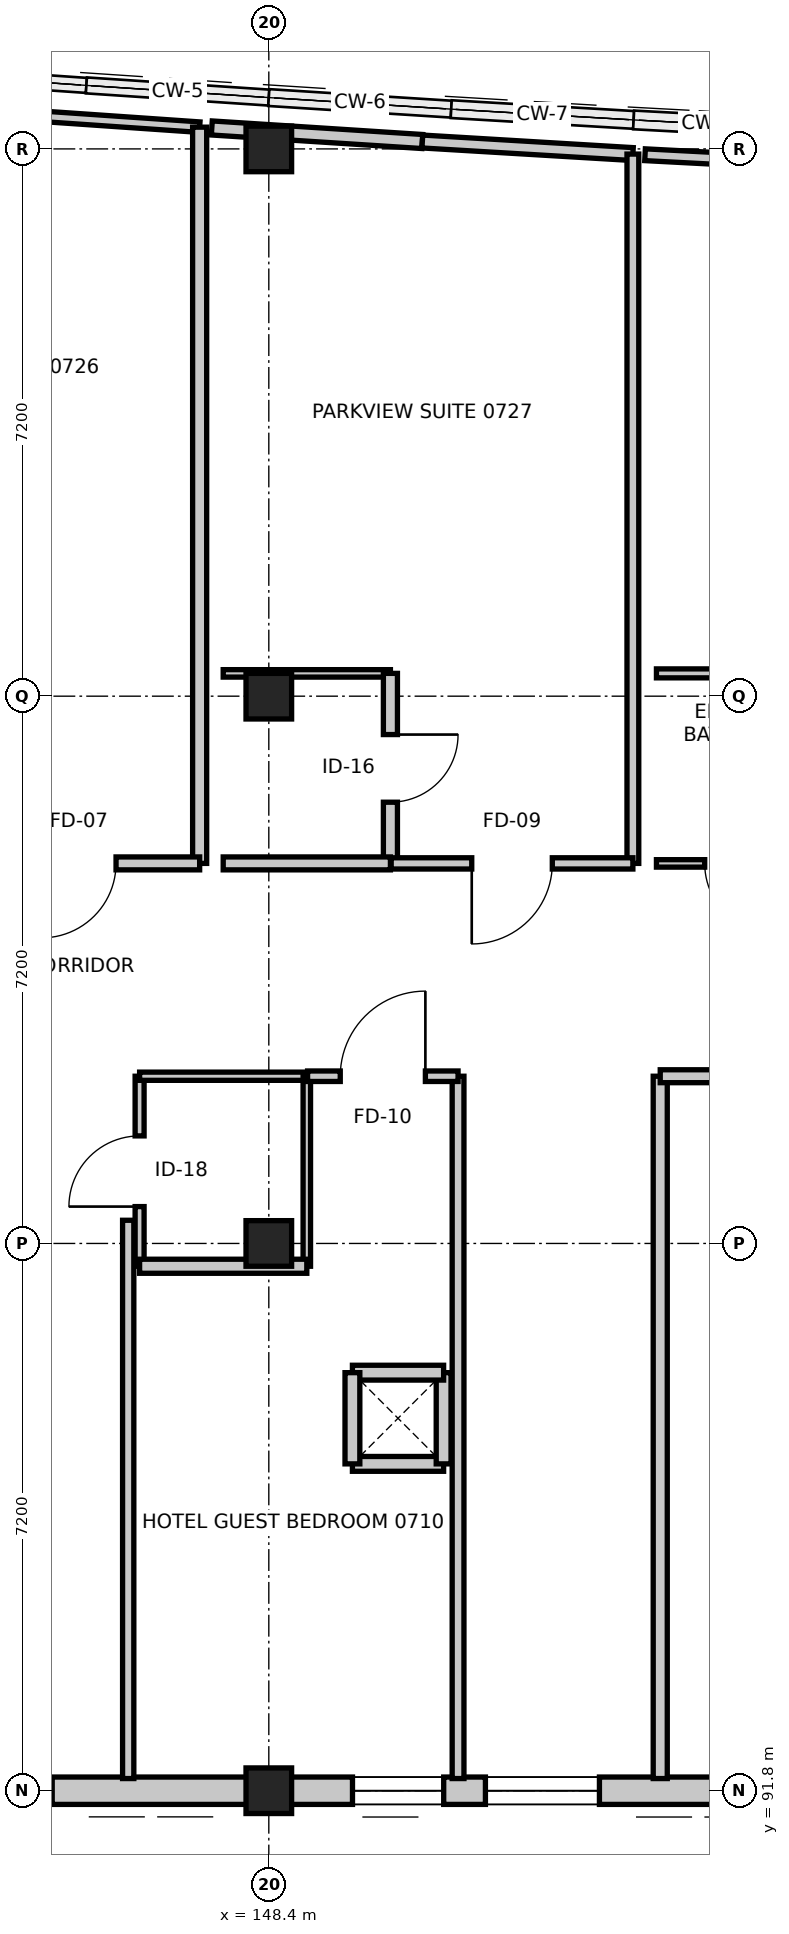
"""IFC4 building model, lengths in metres.
Left out: names, types, materials, properties, quantities, classifications, styles, units other than length and angle.
Written with IfcOpenShell. Run it as: python <this file> out.ifc"""

import sys

from ifc_helpers import new_model, si_unit, direction, frame, frame_2d, origin, origin_2d, place, context, subcontext, project, spatial, rectangle, extrude, element, fill, save


model = new_model("IFC4")
c1 = context("Model", 3, precision=1e-05, world=origin(), true_north=direction((0.0, 1.0)))
c2 = subcontext(c1, "Body", "Model", "MODEL_VIEW")
j1 = project(units=[si_unit("LENGTHUNIT", "METRE"), si_unit("PLANEANGLEUNIT", "RADIAN")], contexts=[c1])
p1 = place(None, origin())
s1 = spatial("IfcSite", under=j1, at=p1, CompositionType="ELEMENT")
p2 = place(p1, origin())
s2 = spatial("IfcBuilding", under=s1, at=p2, CompositionType="ELEMENT")
p3 = place(p2, frame((0.0, 0.0, 30.0)))
s3 = spatial("IfcBuildingStorey", under=s2, at=p3, CompositionType="ELEMENT", Elevation=30.0)
for number, where, z_axis, x_axis in (
    (1, (148.4, 91.8, 0.0), (0.0, 0.0, 1.0), (1.0, 0.0, 0.0)),
    (2, (148.4, 99.0, 0.0), (0.0, 0.0, 1.0), (1.0, 0.0, 0.0)),
    (3, (148.4, 106.2, 0.0), (0.0, 0.0, 1.0), (1.0, 0.0, 0.0)),
    (4, (148.4, 113.4, 0.0), (0.0, 0.0, 1.0), (1.0, 0.0, 0.0)),
):
    element("IfcColumn", number, at=place(p3, frame(where, z_axis=z_axis, x_axis=x_axis)), inside=s3, PredefinedType="COLUMN", context=c2, shape_type="SweptSolid", body=[
        extrude(rectangle(XDim=0.6, YDim=0.6, at=origin_2d()), origin(), (0.0, 0.0, 1.0), 3.6),
    ])
p4 = place(p3, frame((155.6, 91.8, 0.0), z_axis=(0.0, 0.0, 1.0), x_axis=(-1.0, 0.0, 0.0)))
e5 = element("IfcWall", 5, at=p4, inside=s3, PredefinedType="STANDARD", context=c2, shape_type="SweptSolid", body=[
    extrude(rectangle(XDim=7.2, YDim=0.36, at=frame_2d((3.6, 0.0))), origin(), (0.0, 0.0, 1.0), 2.745),
])
p5 = place(p4, frame((2.85, 0.0, 0.75)))
e6 = element("IfcOpeningElement", 6, at=p5, cuts=e5, PredefinedType="OPENING", context=c2, shape_type="SweptSolid", body=[
    extrude(rectangle(XDim=1.5, YDim=1.5, at=frame_2d((0.75, 0.75))), frame((0.0, 0.19, 0.0), z_axis=(0.0, -1.0, 0.0), x_axis=(1.0, 0.0, 0.0)), (0.0, 0.0, 1.0), 0.38),
])
p6 = place(p4, frame((4.899, 0.0, 0.85)))
e7 = element("IfcOpeningElement", 7, at=p6, cuts=e5, PredefinedType="OPENING", context=c2, shape_type="SweptSolid", body=[
    extrude(rectangle(XDim=1.2, YDim=1.8, at=frame_2d((0.6, 0.9))), frame((0.0, 0.19, 0.0), z_axis=(0.0, -1.0, 0.0), x_axis=(1.0, 0.0, 0.0)), (0.0, 0.0, 1.0), 0.38),
])
p7 = place(p3, frame((148.4, 91.8, 0.0), z_axis=(0.0, 0.0, 1.0), x_axis=(-1.0, 0.0, 0.0)))
e8 = element("IfcWall", 8, at=p7, inside=s3, PredefinedType="STANDARD", context=c2, shape_type="SweptSolid", body=[
    extrude(rectangle(XDim=7.2, YDim=0.36, at=frame_2d((3.6, 0.0))), origin(), (0.0, 0.0, 1.0), 2.745),
])
p8 = place(p7, frame((2.85, 0.0, 0.75)))
e9 = element("IfcOpeningElement", 9, at=p8, cuts=e8, PredefinedType="OPENING", context=c2, shape_type="SweptSolid", body=[
    extrude(rectangle(XDim=1.5, YDim=1.5, at=frame_2d((0.75, 0.75))), frame((0.0, 0.19, 0.0), z_axis=(0.0, -1.0, 0.0), x_axis=(1.0, 0.0, 0.0)), (0.0, 0.0, 1.0), 0.38),
])
for number, where, z_axis, x_axis in (
    (10, (149.5, 96.1, 0.0), (0.0, 0.0, 1.0), (1.0, 0.0, 0.0)),
    (11, (150.7, 96.1, 0.0), (0.0, 0.0, 1.0), (0.0, 1.0, 0.0)),
    (12, (150.7, 97.3, 0.0), (0.0, 0.0, 1.0), (-1.0, 0.0, 0.0)),
    (13, (149.5, 97.3, 0.0), (0.0, 0.0, 1.0), (0.0, -1.0, 0.0)),
):
    element("IfcWall", number, at=place(p3, frame(where, z_axis=z_axis, x_axis=x_axis)), inside=s3, PredefinedType="PARAPET", context=c2, shape_type="SweptSolid", body=[
        extrude(rectangle(XDim=1.2, YDim=0.195, at=frame_2d((0.6, 0.0))), origin(), (0.0, 0.0, 1.0), 3.36),
    ])
p9 = place(p3, frame((153.55, 91.96, 0.0), z_axis=(0.0, 0.0, 1.0), x_axis=(0.0, 1.0, 0.0)))
e14 = element("IfcWall", 14, at=p9, inside=s3, PredefinedType="PARTITIONING", context=c2, shape_type="SweptSolid", body=[
    extrude(rectangle(XDim=9.24, YDim=0.185, at=frame_2d((4.62, 0.0))), origin(), (0.0, 0.0, 1.0), 2.745),
])
p10 = place(p3, frame((153.55, 101.2, 0.0), z_axis=(0.0, 0.0, 1.0), x_axis=(1.0, 0.0, 0.0)))
e15 = element("IfcWall", 15, at=p10, inside=s3, PredefinedType="PARTITIONING", context=c2, shape_type="SweptSolid", body=[
    extrude(rectangle(XDim=8.8, YDim=0.17, at=frame_2d((4.4, 0.0))), origin(), (0.0, 0.0, 1.0), 2.695),
])
p11 = place(p10, frame((3.5, 0.0, 0.0)))
e16 = element("IfcOpeningElement", 16, at=p11, cuts=e15, PredefinedType="OPENING", context=c2, shape_type="SweptSolid", body=[
    extrude(rectangle(XDim=1.8, YDim=2.2, at=frame_2d((0.9, 1.1))), frame((0.0, 0.095, 0.0), z_axis=(0.0, -1.0, 0.0), x_axis=(1.0, 0.0, 0.0)), (0.0, 0.0, 1.0), 0.19),
])
p12 = place(p3, frame((146.7, 98.7, 0.0), z_axis=(0.0, 0.0, 1.0), x_axis=(0.0, 1.0, 0.0)))
e17 = element("IfcWall", 17, at=p12, inside=s3, PredefinedType="PARTITIONING", context=c2, shape_type="SweptSolid", body=[
    extrude(rectangle(XDim=2.5, YDim=0.118, at=frame_2d((1.25, 0.0))), origin(), (0.0, 0.0, 1.0), 2.745),
])
p13 = place(p12, frame((0.785, 0.0, 0.0)))
e18 = element("IfcOpeningElement", 18, at=p13, cuts=e17, PredefinedType="OPENING", context=c2, shape_type="SweptSolid", body=[
    extrude(rectangle(XDim=0.93, YDim=2.13, at=frame_2d((0.465, 1.065))), frame((0.0, 0.069, 0.0), z_axis=(0.0, -1.0, 0.0), x_axis=(1.0, 0.0, 0.0)), (0.0, 0.0, 1.0), 0.138),
])
p14 = place(p3, frame((146.7, 101.2, 0.0), z_axis=(0.0, 0.0, 1.0), x_axis=(1.0, 0.0, 0.0)))
e19 = element("IfcWall", 19, at=p14, inside=s3, PredefinedType="PARTITIONING", context=c2, shape_type="SweptSolid", body=[
    extrude(rectangle(XDim=2.2, YDim=0.108, at=frame_2d((1.1, 0.0))), origin(), (0.0, 0.0, 1.0), 2.695),
])
p15 = place(p3, frame((148.9, 101.2, 0.0), z_axis=(0.0, 0.0, 1.0), x_axis=(0.0, -1.0, 0.0)))
e20 = element("IfcWall", 20, at=p15, inside=s3, PredefinedType="PARTITIONING", context=c2, shape_type="SweptSolid", body=[
    extrude(rectangle(XDim=2.5, YDim=0.098, at=frame_2d((1.25, 0.0))), origin(), (0.0, 0.0, 1.0), 2.745),
])
p16 = place(p3, frame((148.9, 98.7, 0.0), z_axis=(0.0, 0.0, 1.0), x_axis=(-1.0, 0.0, 0.0)))
e21 = element("IfcWall", 21, at=p16, inside=s3, PredefinedType="PARTITIONING", context=c2, shape_type="SweptSolid", body=[
    extrude(rectangle(XDim=2.2, YDim=0.185, at=frame_2d((1.1, 0.0))), origin(), (0.0, 0.0, 1.0), 2.695),
])
p17 = place(p3, frame((150.89, 101.2, 0.0), z_axis=(0.0, 0.0, 1.0), x_axis=(0.0, -1.0, 0.0)))
e22 = element("IfcWall", 22, at=p17, inside=s3, PredefinedType="PARTITIONING", context=c2, shape_type="SweptSolid", body=[
    extrude(rectangle(XDim=9.24, YDim=0.155, at=frame_2d((4.62, 0.0))), origin(), (0.0, 0.0, 1.0), 2.745),
])
p18 = place(p3, frame((146.55, 91.96, 0.0), z_axis=(0.0, 0.0, 1.0), x_axis=(0.0, 1.0, 0.0)))
e23 = element("IfcWall", 23, at=p18, inside=s3, PredefinedType="PARTITIONING", context=c2, shape_type="SweptSolid", body=[
    extrude(rectangle(XDim=7.345, YDim=0.148, at=frame_2d((3.672, 0.0))), origin(), (0.0, 0.0, 1.0), 2.745),
])
p19 = place(p3, frame((148.91, 101.2, 0.0), z_axis=(0.0, 0.0, 1.0), x_axis=(1.0, 0.0, 0.0)))
e24 = element("IfcWall", 24, at=p19, inside=s3, PredefinedType="PARTITIONING", context=c2, shape_type="SweptSolid", body=[
    extrude(rectangle(XDim=1.98, YDim=0.138, at=frame_2d((0.99, 0.0))), origin(), (0.0, 0.0, 1.0), 3.36),
])
p20 = place(p19, frame((0.43, 0.0, 0.0)))
e25 = element("IfcOpeningElement", 25, at=p20, cuts=e24, PredefinedType="OPENING", context=c2, shape_type="SweptSolid", body=[
    extrude(rectangle(XDim=1.12, YDim=2.2, at=frame_2d((0.56, 1.1))), frame((0.0, 0.079, 0.0), z_axis=(0.0, -1.0, 0.0), x_axis=(1.0, 0.0, 0.0)), (0.0, 0.0, 1.0), 0.158),
])
p21 = place(p3, frame((141.95, 114.068, 0.0), z_axis=(0.0, 0.0, 1.0), x_axis=(0.997630224365, -0.068803600438, 0.0)))
e26 = element("IfcWall", 26, at=p21, inside=s3, PredefinedType="PARTITIONING", context=c2, shape_type="SweptSolid", body=[
    extrude(rectangle(XDim=5.553, YDim=0.138, at=frame_2d((2.777, 0.0))), origin(), (0.0, 0.0, 1.0), 2.936),
])
p22 = place(p3, frame((147.49, 113.686, 0.0), z_axis=(0.0, 0.0, 1.0), x_axis=(0.0, -1.0, 0.0)))
e27 = element("IfcWall", 27, at=p22, inside=s3, PredefinedType="PARTITIONING", context=c2, shape_type="SweptSolid", body=[
    extrude(rectangle(XDim=9.686, YDim=0.185, at=frame_2d((4.843, 0.0))), origin(), (0.0, 0.0, 1.0), 2.745),
])
p23 = place(p3, frame((147.49, 104.0, 0.0), z_axis=(0.0, 0.0, 1.0), x_axis=(-1.0, 0.0, 0.0)))
e28 = element("IfcWall", 28, at=p23, inside=s3, PredefinedType="PARTITIONING", context=c2, shape_type="SweptSolid", body=[
    extrude(rectangle(XDim=3.18, YDim=0.17, at=frame_2d((1.59, 0.0))), origin(), (0.0, 0.0, 1.0), 3.36),
])
p24 = place(p23, frame((1.1, 0.0, 0.0)))
e29 = element("IfcOpeningElement", 29, at=p24, cuts=e28, PredefinedType="OPENING", context=c2, shape_type="SweptSolid", body=[
    extrude(rectangle(XDim=0.98, YDim=2.15, at=frame_2d((0.49, 1.075))), frame((0.0, 0.095, 0.0), z_axis=(0.0, -1.0, 0.0), x_axis=(1.0, 0.0, 0.0)), (0.0, 0.0, 1.0), 0.19),
])
p25 = place(p3, frame((147.8, 106.5, 0.0), z_axis=(0.0, 0.0, 1.0), x_axis=(1.0, 0.0, 0.0)))
e30 = element("IfcWall", 30, at=p25, inside=s3, PredefinedType="PARTITIONING", context=c2, shape_type="SweptSolid", body=[
    extrude(rectangle(XDim=2.2, YDim=0.098, at=frame_2d((1.1, 0.0))), origin(), (0.0, 0.0, 1.0), 2.695),
])
p26 = place(p3, frame((150.0, 106.5, 0.0), z_axis=(0.0, 0.0, 1.0), x_axis=(0.0, -1.0, 0.0)))
e31 = element("IfcWall", 31, at=p26, inside=s3, PredefinedType="PARTITIONING", context=c2, shape_type="SweptSolid", body=[
    extrude(rectangle(XDim=2.5, YDim=0.185, at=frame_2d((1.25, 0.0))), origin(), (0.0, 0.0, 1.0), 2.745),
])
p27 = place(p26, frame((0.805, 0.0, 0.0)))
e32 = element("IfcOpeningElement", 32, at=p27, cuts=e31, PredefinedType="OPENING", context=c2, shape_type="SweptSolid", body=[
    extrude(rectangle(XDim=0.89, YDim=2.09, at=frame_2d((0.445, 1.045))), frame((0.0, 0.103, 0.0), z_axis=(0.0, -1.0, 0.0), x_axis=(1.0, 0.0, 0.0)), (0.0, 0.0, 1.0), 0.205),
])
p28 = place(p3, frame((150.0, 104.0, 0.0), z_axis=(0.0, 0.0, 1.0), x_axis=(-1.0, 0.0, 0.0)))
e33 = element("IfcWall", 33, at=p28, inside=s3, PredefinedType="PARTITIONING", context=c2, shape_type="SweptSolid", body=[
    extrude(rectangle(XDim=2.2, YDim=0.17, at=frame_2d((1.1, 0.0))), origin(), (0.0, 0.0, 1.0), 2.695),
])
p29 = place(p3, frame((147.65, 113.675, 0.0), z_axis=(0.0, 0.0, 1.0), x_axis=(0.997942227438, -0.064119503244, 0.0)))
e34 = element("IfcWall", 34, at=p29, inside=s3, PredefinedType="PARTITIONING", context=c2, shape_type="SweptSolid", body=[
    extrude(rectangle(XDim=2.776, YDim=0.185, at=frame_2d((1.388, 0.0))), origin(), (0.0, 0.0, 1.0), 2.745),
])
p30 = place(p3, frame((150.42, 113.497, 0.0), z_axis=(0.0, 0.0, 1.0), x_axis=(0.998224568203, -0.059562668136, 0.0)))
e35 = element("IfcWall", 35, at=p30, inside=s3, PredefinedType="PARTITIONING", context=c2, shape_type="SweptSolid", body=[
    extrude(rectangle(XDim=2.775, YDim=0.17, at=frame_2d((1.387, 0.0))), origin(), (0.0, 0.0, 1.0), 2.745),
])
p31 = place(p3, frame((153.19, 113.332, 0.0), z_axis=(0.0, 0.0, 1.0), x_axis=(0.0, -1.0, 0.0)))
e36 = element("IfcWall", 36, at=p31, inside=s3, PredefinedType="PARTITIONING", context=c2, shape_type="SweptSolid", body=[
    extrude(rectangle(XDim=9.332, YDim=0.155, at=frame_2d((4.666, 0.0))), origin(), (0.0, 0.0, 1.0), 2.745),
])
p32 = place(p3, frame((153.19, 104.0, 0.0), z_axis=(0.0, 0.0, 1.0), x_axis=(-1.0, 0.0, 0.0)))
e37 = element("IfcWall", 37, at=p32, inside=s3, PredefinedType="PARTITIONING", context=c2, shape_type="SweptSolid", body=[
    extrude(rectangle(XDim=3.18, YDim=0.148, at=frame_2d((1.59, 0.0))), origin(), (0.0, 0.0, 1.0), 3.36),
])
p33 = place(p32, frame((1.06, 0.0, 0.0)))
e38 = element("IfcOpeningElement", 38, at=p33, cuts=e37, PredefinedType="OPENING", context=c2, shape_type="SweptSolid", body=[
    extrude(rectangle(XDim=1.06, YDim=2.2, at=frame_2d((0.53, 1.1))), frame((0.0, 0.084, 0.0), z_axis=(0.0, -1.0, 0.0), x_axis=(1.0, 0.0, 0.0)), (0.0, 0.0, 1.0), 0.168),
])
p34 = place(p3, frame((153.5, 106.5, 0.0), z_axis=(0.0, 0.0, 1.0), x_axis=(1.0, 0.0, 0.0)))
e39 = element("IfcWall", 39, at=p34, inside=s3, PredefinedType="PARTITIONING", context=c2, shape_type="SweptSolid", body=[
    extrude(rectangle(XDim=1.84, YDim=0.118, at=frame_2d((0.92, 0.0))), origin(), (0.0, 0.0, 1.0), 3.36),
])
p35 = place(p3, frame((155.7, 104.0, 0.0), z_axis=(0.0, 0.0, 1.0), x_axis=(-1.0, 0.0, 0.0)))
e40 = element("IfcWall", 40, at=p35, inside=s3, PredefinedType="PARTITIONING", context=c2, shape_type="SweptSolid", body=[
    extrude(rectangle(XDim=2.2, YDim=0.098, at=frame_2d((1.1, 0.0))), origin(), (0.0, 0.0, 1.0), 2.695),
])
p36 = place(p35, frame((0.635, 0.0, 0.0)))
e41 = element("IfcOpeningElement", 41, at=p36, cuts=e40, PredefinedType="OPENING", context=c2, shape_type="SweptSolid", body=[
    extrude(rectangle(XDim=0.93, YDim=2.13, at=frame_2d((0.465, 1.065))), frame((0.0, 0.059, 0.0), z_axis=(0.0, -1.0, 0.0), x_axis=(1.0, 0.0, 0.0)), (0.0, 0.0, 1.0), 0.118),
])
p37 = place(p3, frame((153.35, 113.323, 0.0), z_axis=(0.0, 0.0, 1.0), x_axis=(0.9986369707, -0.052193876575, 0.0)))
e42 = element("IfcWall", 42, at=p37, inside=s3, PredefinedType="PARTITIONING", context=c2, shape_type="SweptSolid", body=[
    extrude(rectangle(XDim=2.774, YDim=0.155, at=frame_2d((1.387, 0.0))), origin(), (0.0, 0.0, 1.0), 2.695),
])
p38 = place(p5, origin())
e43 = element("IfcWindow", 43, at=p38, inside=s3, PartitioningType="SINGLE_PANEL", PredefinedType="WINDOW", context=c2, shape_type="SweptSolid", body=[
    extrude(rectangle(XDim=1.5, YDim=1.5, at=frame_2d((0.75, 0.75))), frame((0.0, 0.03, 0.0), z_axis=(0.0, -1.0, 0.0), x_axis=(1.0, 0.0, 0.0)), (0.0, 0.0, 1.0), 0.06),
])
fill(e6, e43)
p39 = place(p13, origin())
e44 = element("IfcDoor", 44, at=p39, inside=s3, OperationType="SINGLE_SWING_LEFT", PredefinedType="DOOR", context=c2, shape_type="SweptSolid", body=[
    extrude(rectangle(XDim=0.93, YDim=2.13, at=frame_2d((0.465, 1.065))), frame((0.0, 0.025, 0.0), z_axis=(0.0, -1.0, 0.0), x_axis=(1.0, 0.0, 0.0)), (0.0, 0.0, 1.0), 0.05),
])
fill(e18, e44)
p40 = place(p20, origin())
e45 = element("IfcDoor", 45, at=p40, inside=s3, OperationType="SINGLE_SWING_RIGHT", PredefinedType="DOOR", context=c2, shape_type="SweptSolid", body=[
    extrude(rectangle(XDim=1.12, YDim=2.2, at=frame_2d((0.56, 1.1))), frame((0.0, 0.025, 0.0), z_axis=(0.0, -1.0, 0.0), x_axis=(1.0, 0.0, 0.0)), (0.0, 0.0, 1.0), 0.05),
])
fill(e25, e45)
p41 = place(p24, origin())
e46 = element("IfcDoor", 46, at=p41, inside=s3, OperationType="SINGLE_SWING_RIGHT", PredefinedType="DOOR", context=c2, shape_type="SweptSolid", body=[
    extrude(rectangle(XDim=0.98, YDim=2.15, at=frame_2d((0.49, 1.075))), frame((0.0, 0.025, 0.0), z_axis=(0.0, -1.0, 0.0), x_axis=(1.0, 0.0, 0.0)), (0.0, 0.0, 1.0), 0.05),
])
fill(e29, e46)
p42 = place(p27, origin())
e47 = element("IfcDoor", 47, at=p42, inside=s3, OperationType="SINGLE_SWING_LEFT", PredefinedType="DOOR", context=c2, shape_type="SweptSolid", body=[
    extrude(rectangle(XDim=0.89, YDim=2.09, at=frame_2d((0.445, 1.045))), frame((0.0, 0.025, 0.0), z_axis=(0.0, -1.0, 0.0), x_axis=(1.0, 0.0, 0.0)), (0.0, 0.0, 1.0), 0.05),
])
fill(e32, e47)
p43 = place(p33, origin())
e48 = element("IfcDoor", 48, at=p43, inside=s3, OperationType="SINGLE_SWING_RIGHT", PredefinedType="DOOR", context=c2, shape_type="SweptSolid", body=[
    extrude(rectangle(XDim=1.06, YDim=2.2, at=frame_2d((0.53, 1.1))), frame((0.0, 0.025, 0.0), z_axis=(0.0, -1.0, 0.0), x_axis=(1.0, 0.0, 0.0)), (0.0, 0.0, 1.0), 0.05),
])
fill(e38, e48)
p44 = place(p36, origin())
e49 = element("IfcDoor", 49, at=p44, inside=s3, OperationType="SINGLE_SWING_LEFT", PredefinedType="DOOR", context=c2, shape_type="SweptSolid", body=[
    extrude(rectangle(XDim=0.93, YDim=2.13, at=frame_2d((0.465, 1.065))), frame((0.0, 0.025, 0.0), z_axis=(0.0, -1.0, 0.0), x_axis=(1.0, 0.0, 0.0)), (0.0, 0.0, 1.0), 0.05),
])
fill(e41, e49)
p45 = place(p6, origin())
e50 = element("IfcWindow", 50, at=p45, inside=s3, PartitioningType="SINGLE_PANEL", PredefinedType="WINDOW", context=c2, shape_type="SweptSolid", body=[
    extrude(rectangle(XDim=1.2, YDim=1.8, at=frame_2d((0.6, 0.9))), frame((0.0, 0.03, 0.0), z_axis=(0.0, -1.0, 0.0), x_axis=(1.0, 0.0, 0.0)), (0.0, 0.0, 1.0), 0.06),
])
fill(e7, e50)
save(model, sys.argv[1])
